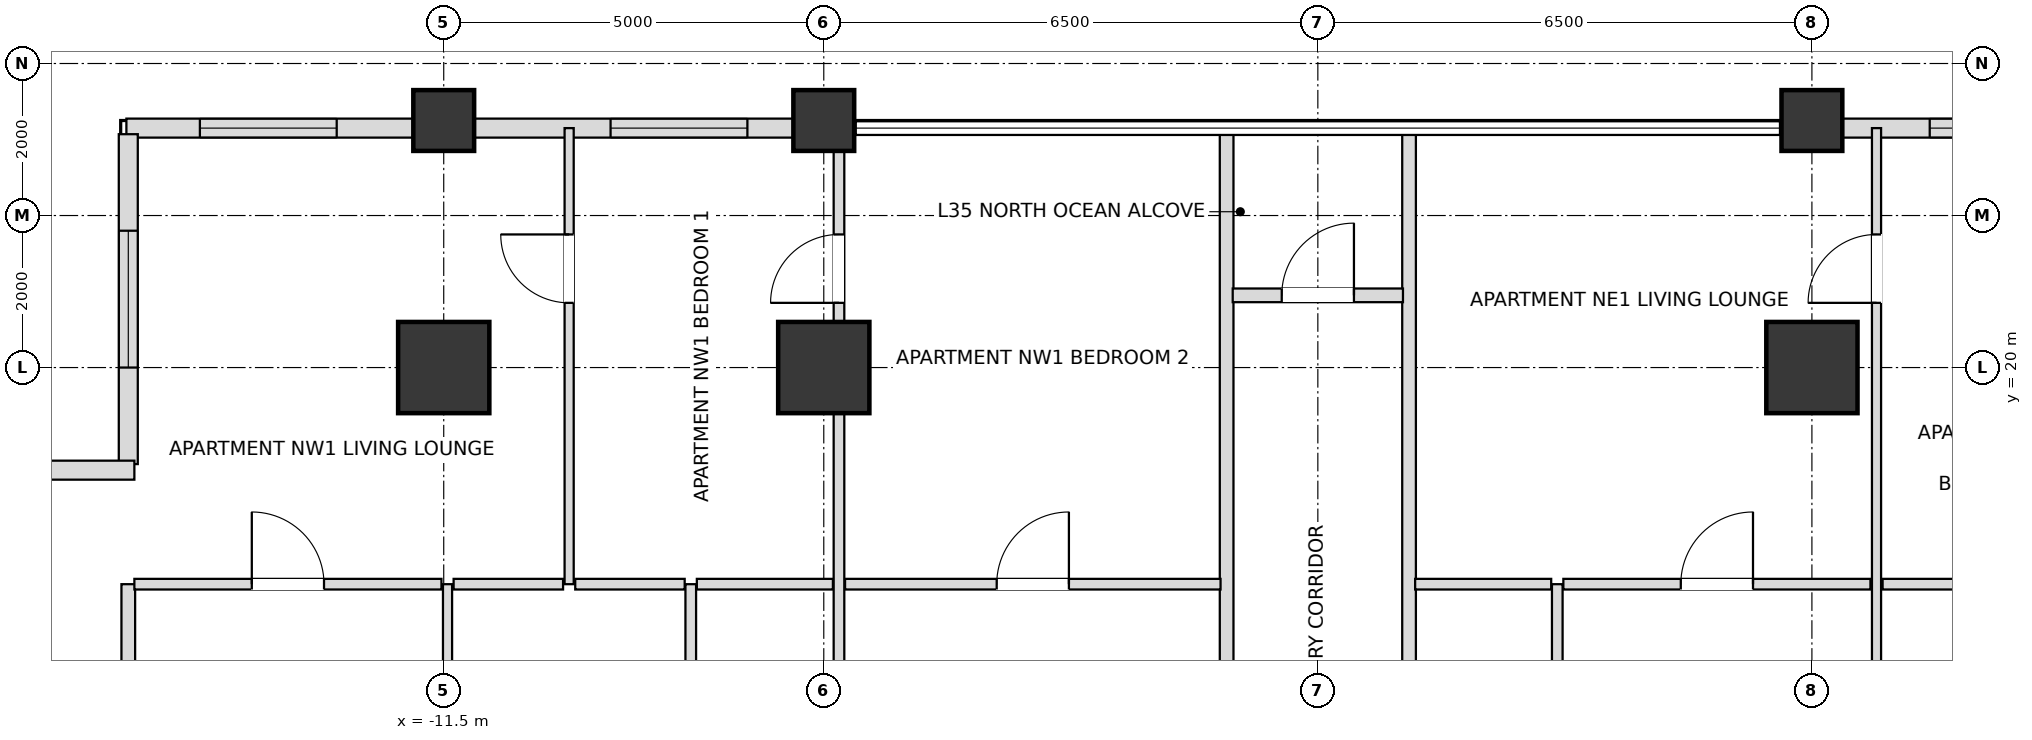
"""IFC4 building model, lengths in metres.
Left out: names, types, materials, properties, quantities, classifications, styles, units other than length and angle.
Written with IfcOpenShell. Run it as: python <this file> out.ifc"""

import sys

from ifc_helpers import new_model, si_unit, direction, frame, frame_2d, origin, origin_2d, place, context, subcontext, project, spatial, rectangle, extrude, element, fill, save


model = new_model("IFC4")
c1 = context("Model", 3, precision=1e-05, world=origin(), true_north=direction((0.0, 1.0)))
c2 = subcontext(c1, "Body", "Model", "MODEL_VIEW")
j1 = project(units=[si_unit("LENGTHUNIT", "METRE"), si_unit("PLANEANGLEUNIT", "RADIAN")], contexts=[c1])
p1 = place(None, origin())
s1 = spatial("IfcSite", under=j1, at=p1, CompositionType="ELEMENT")
p2 = place(p1, origin())
s2 = spatial("IfcBuilding", under=s1, at=p2, CompositionType="ELEMENT")
p3 = place(p2, frame((0.0, 0.0, 140.4)))
s3 = spatial("IfcBuildingStorey", under=s2, at=p3, CompositionType="ELEMENT", Elevation=140.4)
for number, where, z_axis, x_axis in (
    (1, (6.5, 20.0, 0.0), (0.0, 0.0, 1.0), (1.0, 0.0, 0.0)),
    (2, (-6.5, 20.0, 0.0), (0.0, 0.0, 1.0), (1.0, 0.0, 0.0)),
    (3, (-11.5, 20.0, 0.0), (0.0, 0.0, 1.0), (1.0, 0.0, 0.0)),
):
    element("IfcColumn", number, at=place(p3, frame(where, z_axis=z_axis, x_axis=x_axis)), inside=s3, PredefinedType="USERDEFINED", context=c2, shape_type="SweptSolid", body=[
        extrude(rectangle(XDim=1.2, YDim=1.2, at=origin_2d()), origin(), (0.0, 0.0, 1.0), 3.6),
    ])
for number, where, z_axis, x_axis in (
    (4, (-11.5, 23.25, 0.0), (0.0, 0.0, 1.0), (1.0, 0.0, 0.0)),
    (5, (-6.5, 23.25, 0.0), (0.0, 0.0, 1.0), (1.0, 0.0, 0.0)),
    (6, (6.5, 23.25, 0.0), (0.0, 0.0, 1.0), (1.0, 0.0, 0.0)),
):
    element("IfcColumn", number, at=place(p3, frame(where, z_axis=z_axis, x_axis=x_axis)), inside=s3, PredefinedType="COLUMN", context=c2, shape_type="SweptSolid", body=[
        extrude(rectangle(XDim=0.8, YDim=0.8, at=origin_2d()), origin(), (0.0, 0.0, 1.0), 3.6),
    ])
p4 = place(p3, frame((11.105, 23.15, 0.0), z_axis=(0.0, 0.0, 1.0), x_axis=(-1.0, 0.0, 0.0)))
e7 = element("IfcWall", 7, at=p4, inside=s3, PredefinedType="SOLIDWALL", context=c2, shape_type="SweptSolid", body=[
    extrude(rectangle(XDim=4.21, YDim=0.25, at=frame_2d((2.105, 0.0))), origin(), (0.0, 0.0, 1.0), 2.736),
])
p5 = place(p4, frame((1.255, 0.0, 0.72)))
e8 = element("IfcOpeningElement", 8, at=p5, cuts=e7, PredefinedType="OPENING", context=c2, shape_type="SweptSolid", body=[
    extrude(rectangle(XDim=1.8, YDim=1.68, at=frame_2d((0.9, 0.84))), frame((0.0, 0.135, 0.0), z_axis=(0.0, -1.0, 0.0), x_axis=(1.0, 0.0, 0.0)), (0.0, 0.0, 1.0), 0.27),
])
p6 = place(p3, frame((-6.895, 23.15, 0.0), z_axis=(0.0, 0.0, 1.0), x_axis=(-1.0, 0.0, 0.0)))
e9 = element("IfcWall", 9, at=p6, inside=s3, PredefinedType="SOLIDWALL", context=c2, shape_type="SweptSolid", body=[
    extrude(rectangle(XDim=4.21, YDim=0.25, at=frame_2d((2.105, 0.0))), origin(), (0.0, 0.0, 1.0), 2.736),
])
p7 = place(p6, frame((0.61, 0.0, 0.72)))
e10 = element("IfcOpeningElement", 10, at=p7, cuts=e9, PredefinedType="OPENING", context=c2, shape_type="SweptSolid", body=[
    extrude(rectangle(XDim=1.8, YDim=1.68, at=frame_2d((0.9, 0.84))), frame((0.0, 0.135, 0.0), z_axis=(0.0, -1.0, 0.0), x_axis=(1.0, 0.0, 0.0)), (0.0, 0.0, 1.0), 0.27),
])
p8 = place(p3, frame((-11.895, 23.15, 0.0), z_axis=(0.0, 0.0, 1.0), x_axis=(-1.0, 0.0, 0.0)))
e11 = element("IfcWall", 11, at=p8, inside=s3, PredefinedType="SOLIDWALL", context=c2, shape_type="SweptSolid", body=[
    extrude(rectangle(XDim=3.78, YDim=0.25, at=frame_2d((1.89, 0.0))), origin(), (0.0, 0.0, 1.0), 2.736),
])
p9 = place(p8, frame((1.013, 0.0, 0.72)))
e12 = element("IfcOpeningElement", 12, at=p9, cuts=e11, PredefinedType="OPENING", context=c2, shape_type="SweptSolid", body=[
    extrude(rectangle(XDim=1.8, YDim=1.68, at=frame_2d((0.9, 0.84))), frame((0.0, 0.135, 0.0), z_axis=(0.0, -1.0, 0.0), x_axis=(1.0, 0.0, 0.0)), (0.0, 0.0, 1.0), 0.27),
])
p10 = place(p3, frame((-15.65, 23.07, 0.0), z_axis=(0.0, 0.0, 1.0), x_axis=(0.0, -1.0, 0.0)))
e13 = element("IfcWall", 13, at=p10, inside=s3, PredefinedType="SOLIDWALL", context=c2, shape_type="SweptSolid", body=[
    extrude(rectangle(XDim=4.34, YDim=0.25, at=frame_2d((2.17, 0.0))), origin(), (0.0, 0.0, 1.0), 2.736),
])
p11 = place(p10, frame((1.27, 0.0, 0.72)))
e14 = element("IfcOpeningElement", 14, at=p11, cuts=e13, PredefinedType="OPENING", context=c2, shape_type="SweptSolid", body=[
    extrude(rectangle(XDim=1.8, YDim=1.68, at=frame_2d((0.9, 0.84))), frame((0.0, 0.135, 0.0), z_axis=(0.0, -1.0, 0.0), x_axis=(1.0, 0.0, 0.0)), (0.0, 0.0, 1.0), 0.27),
])
p12 = place(p3, frame((-15.57, 18.65, 0.0), z_axis=(0.0, 0.0, 1.0), x_axis=(-1.0, 0.0, 0.0)))
e15 = element("IfcWall", 15, at=p12, inside=s3, PredefinedType="SOLIDWALL", context=c2, shape_type="SweptSolid", body=[
    extrude(rectangle(XDim=4.66, YDim=0.25, at=frame_2d((2.33, 0.0))), origin(), (0.0, 0.0, 1.0), 2.736),
])
p13 = place(p12, frame((1.43, 0.0, 0.72)))
e16 = element("IfcOpeningElement", 16, at=p13, cuts=e15, PredefinedType="OPENING", context=c2, shape_type="SweptSolid", body=[
    extrude(rectangle(XDim=1.8, YDim=1.68, at=frame_2d((0.9, 0.84))), frame((0.0, 0.135, 0.0), z_axis=(0.0, -1.0, 0.0), x_axis=(1.0, 0.0, 0.0)), (0.0, 0.0, 1.0), 0.27),
])
p14 = place(p3, frame((-15.65, 9.8, 0.0), z_axis=(0.0, 0.0, 1.0), x_axis=(0.0, 1.0, 0.0)))
e17 = element("IfcWall", 17, at=p14, inside=s3, PredefinedType="PARTITIONING", context=c2, shape_type="SweptSolid", body=[
    extrude(rectangle(XDim=7.35, YDim=0.18, at=frame_2d((3.675, 0.0))), origin(), (0.0, 0.0, 1.0), 2.736),
])
p15 = place(p3, frame((-11.45, 9.8, 0.0), z_axis=(0.0, 0.0, 1.0), x_axis=(0.0, 1.0, 0.0)))
e18 = element("IfcWall", 18, at=p15, inside=s3, PredefinedType="PARTITIONING", context=c2, shape_type="SweptSolid", body=[
    extrude(rectangle(XDim=7.35, YDim=0.12, at=frame_2d((3.675, 0.0))), origin(), (0.0, 0.0, 1.0), 2.736),
])
p16 = place(p15, frame((3.713, 0.0, 0.0)))
e19 = element("IfcOpeningElement", 19, at=p16, cuts=e18, PredefinedType="OPENING", context=c2, shape_type="SweptSolid", body=[
    extrude(rectangle(XDim=0.95, YDim=2.1, at=frame_2d((0.475, 1.05))), frame((0.0, 0.07, 0.0), z_axis=(0.0, -1.0, 0.0), x_axis=(1.0, 0.0, 0.0)), (0.0, 0.0, 1.0), 0.14),
])
p17 = place(p3, frame((-9.85, 17.15, 0.0), z_axis=(0.0, 0.0, 1.0), x_axis=(0.0, 1.0, 0.0)))
e20 = element("IfcWall", 20, at=p17, inside=s3, PredefinedType="PARTITIONING", context=c2, shape_type="SweptSolid", body=[
    extrude(rectangle(XDim=6.0, YDim=0.12, at=frame_2d((3.0, 0.0))), origin(), (0.0, 0.0, 1.0), 2.816),
])
p18 = place(p17, frame((3.701, 0.0, 0.0)))
e21 = element("IfcOpeningElement", 21, at=p18, cuts=e20, PredefinedType="OPENING", context=c2, shape_type="SweptSolid", body=[
    extrude(rectangle(XDim=0.9, YDim=2.1, at=frame_2d((0.45, 1.05))), frame((0.0, 0.07, 0.0), z_axis=(0.0, -1.0, 0.0), x_axis=(1.0, 0.0, 0.0)), (0.0, 0.0, 1.0), 0.14),
])
p19 = place(p3, frame((-8.25, 9.8, 0.0), z_axis=(0.0, 0.0, 1.0), x_axis=(0.0, 1.0, 0.0)))
e22 = element("IfcWall", 22, at=p19, inside=s3, PredefinedType="PARTITIONING", context=c2, shape_type="SweptSolid", body=[
    extrude(rectangle(XDim=7.35, YDim=0.14, at=frame_2d((3.675, 0.0))), origin(), (0.0, 0.0, 1.0), 2.816),
])
p20 = place(p19, frame((3.22, 0.0, 0.0)))
e23 = element("IfcOpeningElement", 23, at=p20, cuts=e22, PredefinedType="OPENING", context=c2, shape_type="SweptSolid", body=[
    extrude(rectangle(XDim=0.9, YDim=2.1, at=frame_2d((0.45, 1.05))), frame((0.0, 0.08, 0.0), z_axis=(0.0, -1.0, 0.0), x_axis=(1.0, 0.0, 0.0)), (0.0, 0.0, 1.0), 0.16),
])
p21 = place(p3, frame((-6.3, 9.8, 0.0), z_axis=(0.0, 0.0, 1.0), x_axis=(0.0, 1.0, 0.0)))
e24 = element("IfcWall", 24, at=p21, inside=s3, PredefinedType="PARTITIONING", context=c2, shape_type="SweptSolid", body=[
    extrude(rectangle(XDim=13.35, YDim=0.14, at=frame_2d((6.675, 0.0))), origin(), (0.0, 0.0, 1.0), 2.816),
])
p22 = place(p21, frame((11.051, 0.0, 0.0)))
e25 = element("IfcOpeningElement", 25, at=p22, cuts=e24, PredefinedType="OPENING", context=c2, shape_type="SweptSolid", body=[
    extrude(rectangle(XDim=0.9, YDim=2.1, at=frame_2d((0.45, 1.05))), frame((0.0, 0.08, 0.0), z_axis=(0.0, -1.0, 0.0), x_axis=(1.0, 0.0, 0.0)), (0.0, 0.0, 1.0), 0.16),
])
for number, where, z_axis, x_axis in (
    (26, (-1.2, 9.8, 0.0), (0.0, 0.0, 1.0), (0.0, 1.0, 0.0)),
    (27, (1.2, 9.8, 0.0), (0.0, 0.0, 1.0), (0.0, 1.0, 0.0)),
):
    element("IfcWall", number, at=place(p3, frame(where, z_axis=z_axis, x_axis=x_axis)), inside=s3, PredefinedType="PARTITIONING", context=c2, shape_type="SweptSolid", body=[
        extrude(rectangle(XDim=13.35, YDim=0.18, at=frame_2d((6.675, 0.0))), origin(), (0.0, 0.0, 1.0), 2.816),
    ])
p23 = place(p3, frame((3.15, 9.8, 0.0), z_axis=(0.0, 0.0, 1.0), x_axis=(0.0, 1.0, 0.0)))
e28 = element("IfcWall", 28, at=p23, inside=s3, PredefinedType="PARTITIONING", context=c2, shape_type="SweptSolid", body=[
    extrude(rectangle(XDim=7.35, YDim=0.14, at=frame_2d((3.675, 0.0))), origin(), (0.0, 0.0, 1.0), 3.38),
])
p24 = place(p23, frame((3.22, 0.0, 0.0)))
e29 = element("IfcOpeningElement", 29, at=p24, cuts=e28, PredefinedType="OPENING", context=c2, shape_type="SweptSolid", body=[
    extrude(rectangle(XDim=0.9, YDim=2.1, at=frame_2d((0.45, 1.05))), frame((0.0, 0.08, 0.0), z_axis=(0.0, -1.0, 0.0), x_axis=(1.0, 0.0, 0.0)), (0.0, 0.0, 1.0), 0.16),
])
p25 = place(p3, frame((7.35, 9.8, 0.0), z_axis=(0.0, 0.0, 1.0), x_axis=(0.0, 1.0, 0.0)))
e30 = element("IfcWall", 30, at=p25, inside=s3, PredefinedType="PARTITIONING", context=c2, shape_type="SweptSolid", body=[
    extrude(rectangle(XDim=13.35, YDim=0.12, at=frame_2d((6.675, 0.0))), origin(), (0.0, 0.0, 1.0), 2.816),
])
p26 = place(p25, frame((3.195, 0.0, 0.0)))
e31 = element("IfcOpeningElement", 31, at=p26, cuts=e30, PredefinedType="OPENING", context=c2, shape_type="SweptSolid", body=[
    extrude(rectangle(XDim=0.95, YDim=2.1, at=frame_2d((0.475, 1.05))), frame((0.0, 0.07, 0.0), z_axis=(0.0, -1.0, 0.0), x_axis=(1.0, 0.0, 0.0)), (0.0, 0.0, 1.0), 0.14),
])
p27 = place(p25, frame((11.051, 0.0, 0.0)))
e32 = element("IfcOpeningElement", 32, at=p27, cuts=e30, PredefinedType="OPENING", context=c2, shape_type="SweptSolid", body=[
    extrude(rectangle(XDim=0.9, YDim=2.1, at=frame_2d((0.45, 1.05))), frame((0.0, 0.07, 0.0), z_axis=(0.0, -1.0, 0.0), x_axis=(1.0, 0.0, 0.0)), (0.0, 0.0, 1.0), 0.14),
])
p28 = place(p3, frame((-15.57, 17.15, 0.0), z_axis=(0.0, 0.0, 1.0), x_axis=(1.0, 0.0, 0.0)))
e33 = element("IfcWall", 33, at=p28, inside=s3, PredefinedType="PARTITIONING", context=c2, shape_type="SweptSolid", body=[
    extrude(rectangle(XDim=4.04, YDim=0.14, at=frame_2d((2.02, 0.0))), origin(), (0.0, 0.0, 1.0), 2.736),
])
p29 = place(p28, frame((1.545, 0.0, 0.0)))
e34 = element("IfcOpeningElement", 34, at=p29, cuts=e33, PredefinedType="OPENING", context=c2, shape_type="SweptSolid", body=[
    extrude(rectangle(XDim=0.95, YDim=2.1, at=frame_2d((0.475, 1.05))), frame((0.0, 0.08, 0.0), z_axis=(0.0, -1.0, 0.0), x_axis=(1.0, 0.0, 0.0)), (0.0, 0.0, 1.0), 0.16),
])
p30 = place(p3, frame((-11.37, 17.15, 0.0), z_axis=(0.0, 0.0, 1.0), x_axis=(1.0, 0.0, 0.0)))
e35 = element("IfcWall", 35, at=p30, inside=s3, PredefinedType="PARTITIONING", context=c2, shape_type="SweptSolid", body=[
    extrude(rectangle(XDim=1.44, YDim=0.14, at=frame_2d((0.72, 0.0))), origin(), (0.0, 0.0, 1.0), 3.38),
])
p31 = place(p3, frame((-9.77, 17.15, 0.0), z_axis=(0.0, 0.0, 1.0), x_axis=(1.0, 0.0, 0.0)))
e36 = element("IfcWall", 36, at=p31, inside=s3, PredefinedType="PARTITIONING", context=c2, shape_type="SweptSolid", body=[
    extrude(rectangle(XDim=1.44, YDim=0.14, at=frame_2d((0.72, 0.0))), origin(), (0.0, 0.0, 1.0), 3.38),
])
p32 = place(p3, frame((-8.17, 17.15, 0.0), z_axis=(0.0, 0.0, 1.0), x_axis=(1.0, 0.0, 0.0)))
e37 = element("IfcWall", 37, at=p32, inside=s3, PredefinedType="PARTITIONING", context=c2, shape_type="SweptSolid", body=[
    extrude(rectangle(XDim=1.79, YDim=0.14, at=frame_2d((0.895, 0.0))), origin(), (0.0, 0.0, 1.0), 2.816),
])
p33 = place(p3, frame((-6.22, 17.15, 0.0), z_axis=(0.0, 0.0, 1.0), x_axis=(1.0, 0.0, 0.0)))
e38 = element("IfcWall", 38, at=p33, inside=s3, PredefinedType="PARTITIONING", context=c2, shape_type="SweptSolid", body=[
    extrude(rectangle(XDim=4.94, YDim=0.14, at=frame_2d((2.47, 0.0))), origin(), (0.0, 0.0, 1.0), 3.38),
])
p34 = place(p33, frame((1.995, 0.0, 0.0)))
e39 = element("IfcOpeningElement", 39, at=p34, cuts=e38, PredefinedType="OPENING", context=c2, shape_type="SweptSolid", body=[
    extrude(rectangle(XDim=0.95, YDim=2.1, at=frame_2d((0.475, 1.05))), frame((0.0, 0.08, 0.0), z_axis=(0.0, -1.0, 0.0), x_axis=(1.0, 0.0, 0.0)), (0.0, 0.0, 1.0), 0.16),
])
p35 = place(p3, frame((1.28, 17.15, 0.0), z_axis=(0.0, 0.0, 1.0), x_axis=(1.0, 0.0, 0.0)))
e40 = element("IfcWall", 40, at=p35, inside=s3, PredefinedType="PARTITIONING", context=c2, shape_type="SweptSolid", body=[
    extrude(rectangle(XDim=1.79, YDim=0.14, at=frame_2d((0.895, 0.0))), origin(), (0.0, 0.0, 1.0), 3.38),
])
p36 = place(p3, frame((3.23, 17.15, 0.0), z_axis=(0.0, 0.0, 1.0), x_axis=(1.0, 0.0, 0.0)))
e41 = element("IfcWall", 41, at=p36, inside=s3, PredefinedType="PARTITIONING", context=c2, shape_type="SweptSolid", body=[
    extrude(rectangle(XDim=4.04, YDim=0.14, at=frame_2d((2.02, 0.0))), origin(), (0.0, 0.0, 1.0), 2.816),
])
p37 = place(p36, frame((1.545, 0.0, 0.0)))
e42 = element("IfcOpeningElement", 42, at=p37, cuts=e41, PredefinedType="OPENING", context=c2, shape_type="SweptSolid", body=[
    extrude(rectangle(XDim=0.95, YDim=2.1, at=frame_2d((0.475, 1.05))), frame((0.0, 0.08, 0.0), z_axis=(0.0, -1.0, 0.0), x_axis=(1.0, 0.0, 0.0)), (0.0, 0.0, 1.0), 0.16),
])
p38 = place(p3, frame((7.43, 17.15, 0.0), z_axis=(0.0, 0.0, 1.0), x_axis=(1.0, 0.0, 0.0)))
e43 = element("IfcWall", 43, at=p38, inside=s3, PredefinedType="PARTITIONING", context=c2, shape_type="SweptSolid", body=[
    extrude(rectangle(XDim=3.04, YDim=0.14, at=frame_2d((1.52, 0.0))), origin(), (0.0, 0.0, 1.0), 3.38),
])
p39 = place(p3, frame((-1.12, 20.95, 0.0), z_axis=(0.0, 0.0, 1.0), x_axis=(1.0, 0.0, 0.0)))
e44 = element("IfcWall", 44, at=p39, inside=s3, PredefinedType="PARTITIONING", context=c2, shape_type="SweptSolid", body=[
    extrude(rectangle(XDim=2.24, YDim=0.18, at=frame_2d((1.12, 0.0))), origin(), (0.0, 0.0, 1.0), 3.38),
])
p40 = place(p39, frame((0.645, 0.0, 0.0)))
e45 = element("IfcOpeningElement", 45, at=p40, cuts=e44, PredefinedType="OPENING", context=c2, shape_type="SweptSolid", body=[
    extrude(rectangle(XDim=0.95, YDim=2.15, at=frame_2d((0.475, 1.075))), frame((0.0, 0.1, 0.0), z_axis=(0.0, -1.0, 0.0), x_axis=(1.0, 0.0, 0.0)), (0.0, 0.0, 1.0), 0.2),
])
p41 = place(p5, origin())
e46 = element("IfcWindow", 46, at=p41, inside=s3, PartitioningType="SINGLE_PANEL", PredefinedType="WINDOW", context=c2, shape_type="SweptSolid", body=[
    extrude(rectangle(XDim=1.8, YDim=1.68, at=frame_2d((0.9, 0.84))), frame((0.0, 0.03, 0.0), z_axis=(0.0, -1.0, 0.0), x_axis=(1.0, 0.0, 0.0)), (0.0, 0.0, 1.0), 0.06),
])
fill(e8, e46)
p42 = place(p7, origin())
e47 = element("IfcWindow", 47, at=p42, inside=s3, PartitioningType="SINGLE_PANEL", PredefinedType="WINDOW", context=c2, shape_type="SweptSolid", body=[
    extrude(rectangle(XDim=1.8, YDim=1.68, at=frame_2d((0.9, 0.84))), frame((0.0, 0.03, 0.0), z_axis=(0.0, -1.0, 0.0), x_axis=(1.0, 0.0, 0.0)), (0.0, 0.0, 1.0), 0.06),
])
fill(e10, e47)
p43 = place(p9, origin())
e48 = element("IfcWindow", 48, at=p43, inside=s3, PartitioningType="SINGLE_PANEL", PredefinedType="WINDOW", context=c2, shape_type="SweptSolid", body=[
    extrude(rectangle(XDim=1.8, YDim=1.68, at=frame_2d((0.9, 0.84))), frame((0.0, 0.03, 0.0), z_axis=(0.0, -1.0, 0.0), x_axis=(1.0, 0.0, 0.0)), (0.0, 0.0, 1.0), 0.06),
])
fill(e12, e48)
p44 = place(p11, origin())
e49 = element("IfcWindow", 49, at=p44, inside=s3, PartitioningType="SINGLE_PANEL", PredefinedType="WINDOW", context=c2, shape_type="SweptSolid", body=[
    extrude(rectangle(XDim=1.8, YDim=1.68, at=frame_2d((0.9, 0.84))), frame((0.0, 0.03, 0.0), z_axis=(0.0, -1.0, 0.0), x_axis=(1.0, 0.0, 0.0)), (0.0, 0.0, 1.0), 0.06),
])
fill(e14, e49)
p45 = place(p40, origin())
e50 = element("IfcDoor", 50, at=p45, inside=s3, OperationType="SINGLE_SWING_RIGHT", PredefinedType="DOOR", context=c2, shape_type="SweptSolid", body=[
    extrude(rectangle(XDim=0.95, YDim=2.15, at=frame_2d((0.475, 1.075))), frame((0.0, 0.025, 0.0), z_axis=(0.0, -1.0, 0.0), x_axis=(1.0, 0.0, 0.0)), (0.0, 0.0, 1.0), 0.05),
])
fill(e45, e50)
p46 = place(p34, origin())
e51 = element("IfcDoor", 51, at=p46, inside=s3, OperationType="SINGLE_SWING_RIGHT", PredefinedType="DOOR", context=c2, shape_type="SweptSolid", body=[
    extrude(rectangle(XDim=0.95, YDim=2.1, at=frame_2d((0.475, 1.05))), frame((0.0, 0.025, 0.0), z_axis=(0.0, -1.0, 0.0), x_axis=(1.0, 0.0, 0.0)), (0.0, 0.0, 1.0), 0.05),
])
fill(e39, e51)
p47 = place(p29, origin())
e52 = element("IfcDoor", 52, at=p47, inside=s3, OperationType="SINGLE_SWING_LEFT", PredefinedType="DOOR", context=c2, shape_type="SweptSolid", body=[
    extrude(rectangle(XDim=0.95, YDim=2.1, at=frame_2d((0.475, 1.05))), frame((0.0, 0.025, 0.0), z_axis=(0.0, -1.0, 0.0), x_axis=(1.0, 0.0, 0.0)), (0.0, 0.0, 1.0), 0.05),
])
fill(e34, e52)
p48 = place(p18, origin())
e53 = element("IfcDoor", 53, at=p48, inside=s3, OperationType="SINGLE_SWING_RIGHT", PredefinedType="DOOR", context=c2, shape_type="SweptSolid", body=[
    extrude(rectangle(XDim=0.9, YDim=2.1, at=frame_2d((0.45, 1.05))), frame((0.0, 0.025, 0.0), z_axis=(0.0, -1.0, 0.0), x_axis=(1.0, 0.0, 0.0)), (0.0, 0.0, 1.0), 0.05),
])
fill(e21, e53)
p49 = place(p22, origin())
e54 = element("IfcDoor", 54, at=p49, inside=s3, OperationType="SINGLE_SWING_LEFT", PredefinedType="DOOR", context=c2, shape_type="SweptSolid", body=[
    extrude(rectangle(XDim=0.9, YDim=2.1, at=frame_2d((0.45, 1.05))), frame((0.0, 0.025, 0.0), z_axis=(0.0, -1.0, 0.0), x_axis=(1.0, 0.0, 0.0)), (0.0, 0.0, 1.0), 0.05),
])
fill(e25, e54)
p50 = place(p37, origin())
e55 = element("IfcDoor", 55, at=p50, inside=s3, OperationType="SINGLE_SWING_RIGHT", PredefinedType="DOOR", context=c2, shape_type="SweptSolid", body=[
    extrude(rectangle(XDim=0.95, YDim=2.1, at=frame_2d((0.475, 1.05))), frame((0.0, 0.025, 0.0), z_axis=(0.0, -1.0, 0.0), x_axis=(1.0, 0.0, 0.0)), (0.0, 0.0, 1.0), 0.05),
])
fill(e42, e55)
p51 = place(p27, origin())
e56 = element("IfcDoor", 56, at=p51, inside=s3, OperationType="SINGLE_SWING_LEFT", PredefinedType="DOOR", context=c2, shape_type="SweptSolid", body=[
    extrude(rectangle(XDim=0.9, YDim=2.1, at=frame_2d((0.45, 1.05))), frame((0.0, 0.025, 0.0), z_axis=(0.0, -1.0, 0.0), x_axis=(1.0, 0.0, 0.0)), (0.0, 0.0, 1.0), 0.05),
])
fill(e32, e56)
save(model, sys.argv[1])
